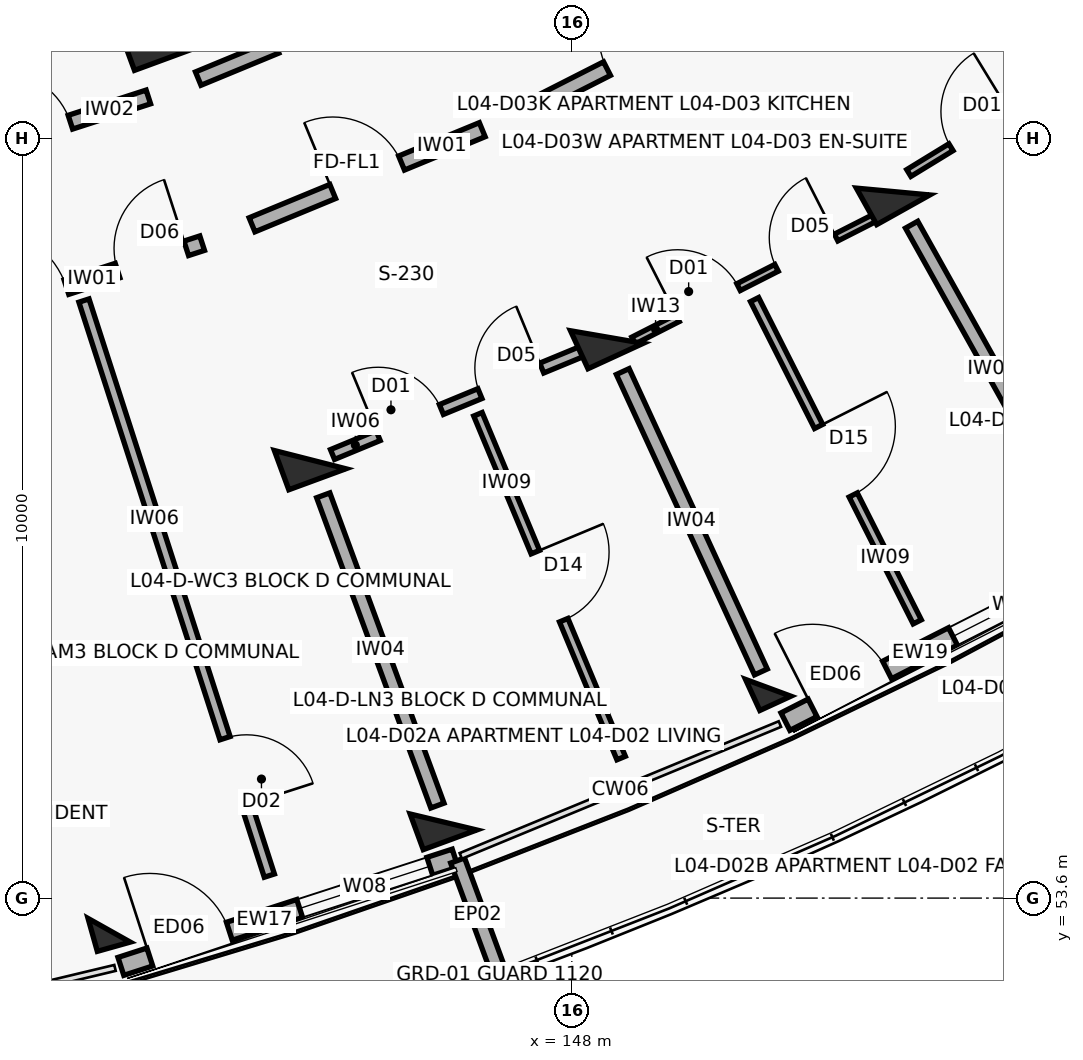
"""IFC4 building model, lengths in metres.
Left out: names, types, materials, properties, quantities, classifications, styles, units other than length and angle.
Written with IfcOpenShell. Run it as: python <this file> out.ifc"""

import sys

from ifc_helpers import new_model, si_unit, direction, frame, frame_2d, origin, origin_2d, place, context, subcontext, project, spatial, rectangle, extrude, element, fill, save


model = new_model("IFC4")
c1 = context("Model", 3, precision=1e-05, world=origin(), true_north=direction((0.0, 1.0)))
c2 = subcontext(c1, "Body", "Model", "MODEL_VIEW")
j1 = project(units=[si_unit("LENGTHUNIT", "METRE"), si_unit("PLANEANGLEUNIT", "RADIAN")], contexts=[c1])
p1 = place(None, origin())
s1 = spatial("IfcSite", under=j1, at=p1, CompositionType="ELEMENT")
p2 = place(p1, origin())
s2 = spatial("IfcBuilding", under=s1, at=p2, CompositionType="ELEMENT")
p3 = place(p2, frame((0.0, 0.0, 14.3)))
s3 = spatial("IfcBuildingStorey", under=s2, at=p3, CompositionType="ELEMENT", Elevation=14.3)
p4 = place(p3, frame((141.913, 53.177, 0.0), z_axis=(0.0, 0.0, 1.0), x_axis=(0.270600445976, -0.962691746426, 0.0)))
e1 = element("IfcColumn", 1, at=p4, inside=s3, PredefinedType="COLUMN", context=c2, shape_type="SweptSolid", body=[
    extrude(rectangle(XDim=0.45, YDim=0.45, at=origin_2d()), origin(), (0.0, 0.0, 1.0), 3.1),
])
for number, where, z_axis, x_axis in (
    (2, (142.527, 64.887, 0.0), (0.0, 0.0, 1.0), (0.345, -0.938, 0.0)),
    (3, (144.557, 59.369, 0.0), (0.0, 0.0, 1.0), (0.345, -0.938, 0.0)),
):
    element("IfcColumn", number, at=place(p3, frame(where, z_axis=z_axis, x_axis=x_axis)), inside=s3, PredefinedType="COLUMN", context=c2, shape_type="SweptSolid", body=[
        extrude(rectangle(XDim=0.55, YDim=0.8, at=origin_2d()), origin(), (0.0, 0.0, 1.0), 3.1),
    ])
p5 = place(p3, frame((146.311, 54.602, 0.0), z_axis=(0.0, 0.0, 1.0), x_axis=(0.345298198999, -0.93849302276, 0.0)))
e4 = element("IfcColumn", 4, at=p5, inside=s3, PredefinedType="COLUMN", context=c2, shape_type="SweptSolid", body=[
    extrude(rectangle(XDim=0.5, YDim=0.75, at=origin_2d()), origin(), (0.0, 0.0, 1.0), 3.1),
])
p6 = place(p3, frame((148.461, 60.982, 0.0), z_axis=(0.0, 0.0, 1.0), x_axis=(0.417867073801, -0.908508177527, 0.0)))
e5 = element("IfcColumn", 5, at=p6, inside=s3, PredefinedType="COLUMN", context=c2, shape_type="SweptSolid", body=[
    extrude(rectangle(XDim=0.55, YDim=0.8, at=origin_2d()), origin(), (0.0, 0.0, 1.0), 3.1),
])
p7 = place(p3, frame((150.584, 56.367, 0.0), z_axis=(0.0, 0.0, 1.0), x_axis=(0.417867073801, -0.908508177527, 0.0)))
e6 = element("IfcColumn", 6, at=p7, inside=s3, PredefinedType="COLUMN", context=c2, shape_type="SweptSolid", body=[
    extrude(rectangle(XDim=0.45, YDim=0.45, at=origin_2d()), origin(), (0.0, 0.0, 1.0), 3.1),
])
p8 = place(p3, frame((152.227, 62.897, 0.0), z_axis=(0.0, 0.0, 1.0), x_axis=(0.487859659139, -0.87292207727, 0.0)))
e7 = element("IfcColumn", 7, at=p8, inside=s3, PredefinedType="COLUMN", context=c2, shape_type="SweptSolid", body=[
    extrude(rectangle(XDim=0.55, YDim=0.8, at=origin_2d()), origin(), (0.0, 0.0, 1.0), 3.1),
])
p9 = place(p3, frame((142.067, 52.701, 0.0), z_axis=(0.0, 0.0, 1.0), x_axis=(0.951311584867, 0.308230868826, 0.0)))
e8 = element("IfcWall", 8, at=p9, inside=s3, PredefinedType="SOLIDWALL", context=c2, shape_type="SweptSolid", body=[
    extrude(rectangle(XDim=4.623, YDim=0.248, at=frame_2d((2.311, 0.0))), origin(), (0.0, 0.0, 1.0), 2.25),
])
p10 = place(p9, frame((0.4, 0.0, 0.0)))
e9 = element("IfcOpeningElement", 9, at=p10, cuts=e8, PredefinedType="OPENING", context=c2, shape_type="SweptSolid", body=[
    extrude(rectangle(XDim=1.1, YDim=2.15, at=frame_2d((0.55, 1.075))), frame((0.0, 0.134, 0.0), z_axis=(0.0, -1.0, 0.0), x_axis=(1.0, 0.0, 0.0)), (0.0, 0.0, 1.0), 0.268),
])
p11 = place(p9, frame((2.472, 0.0, 0.35)))
e10 = element("IfcOpeningElement", 10, at=p11, cuts=e8, PredefinedType="OPENING", context=c2, shape_type="SweptSolid", body=[
    extrude(rectangle(XDim=1.8, YDim=1.65, at=frame_2d((0.9, 0.825))), frame((0.0, 0.134, 0.0), z_axis=(0.0, -1.0, 0.0), x_axis=(1.0, 0.0, 0.0)), (0.0, 0.0, 1.0), 0.268),
])
p12 = place(p3, frame((146.498, 54.095, 0.0), z_axis=(0.0, 0.0, 1.0), x_axis=(0.345328180406, -0.938481991206, 0.0)))
e11 = element("IfcWall", 11, at=p12, inside=s3, PredefinedType="PARAPET", context=c2, shape_type="SweptSolid", body=[
    extrude(rectangle(XDim=1.53, YDim=0.195, at=frame_2d((0.765, 0.0))), origin(), (0.0, 0.0, 1.0), 2.25),
])
p13 = place(p3, frame((150.811, 55.922, 0.0), z_axis=(0.0, 0.0, 1.0), x_axis=(0.891407190547, 0.453203288428, 0.0)))
e12 = element("IfcWall", 12, at=p13, inside=s3, PredefinedType="SOLIDWALL", context=c2, shape_type="SweptSolid", body=[
    extrude(rectangle(XDim=4.623, YDim=0.258, at=frame_2d((2.311, 0.0))), origin(), (0.0, 0.0, 1.0), 2.25),
])
p14 = place(p13, frame((0.4, 0.0, 0.0)))
e13 = element("IfcOpeningElement", 13, at=p14, cuts=e12, PredefinedType="OPENING", context=c2, shape_type="SweptSolid", body=[
    extrude(rectangle(XDim=1.1, YDim=2.15, at=frame_2d((0.55, 1.075))), frame((0.0, 0.139, 0.0), z_axis=(0.0, -1.0, 0.0), x_axis=(1.0, 0.0, 0.0)), (0.0, 0.0, 1.0), 0.278),
])
p15 = place(p13, frame((2.472, 0.0, 0.35)))
e14 = element("IfcOpeningElement", 14, at=p15, cuts=e12, PredefinedType="OPENING", context=c2, shape_type="SweptSolid", body=[
    extrude(rectangle(XDim=1.8, YDim=1.65, at=frame_2d((0.9, 0.825))), frame((0.0, 0.139, 0.0), z_axis=(0.0, -1.0, 0.0), x_axis=(1.0, 0.0, 0.0)), (0.0, 0.0, 1.0), 0.278),
])
p16 = place(p3, frame((140.019, 61.208, 0.0), z_axis=(0.0, 0.0, 1.0), x_axis=(0.951323803878, 0.308193154005, 0.0)))
e15 = element("IfcWall", 15, at=p16, inside=s3, PredefinedType="SOLIDWALL", context=c2, shape_type="SweptSolid", body=[
    extrude(rectangle(XDim=3.277, YDim=0.2, at=frame_2d((1.639, 0.0))), origin(), (0.0, 0.0, 1.0), 2.08),
])
p17 = place(p16, frame((0.28, 0.0, 0.0)))
e16 = element("IfcOpeningElement", 16, at=p17, cuts=e15, PredefinedType="OPENING", context=c2, shape_type="SweptSolid", body=[
    extrude(rectangle(XDim=1.12, YDim=2.15, at=frame_2d((0.56, 1.075))), frame((0.0, 0.11, 0.0), z_axis=(0.0, -1.0, 0.0), x_axis=(1.0, 0.0, 0.0)), (0.0, 0.0, 1.0), 0.22),
])
p18 = place(p16, frame((2.107, 0.0, 0.0)))
e17 = element("IfcOpeningElement", 17, at=p18, cuts=e15, PredefinedType="OPENING", context=c2, shape_type="SweptSolid", body=[
    extrude(rectangle(XDim=0.95, YDim=2.1, at=frame_2d((0.475, 1.05))), frame((0.0, 0.11, 0.0), z_axis=(0.0, -1.0, 0.0), x_axis=(1.0, 0.0, 0.0)), (0.0, 0.0, 1.0), 0.22),
])
p19 = place(p3, frame((139.464, 63.181, 0.0), z_axis=(0.0, 0.0, 1.0), x_axis=(0.951336474448, 0.308154040027, 0.0)))
e18 = element("IfcWall", 18, at=p19, inside=s3, PredefinedType="SOLIDWALL", context=c2, shape_type="SweptSolid", body=[
    extrude(rectangle(XDim=3.116, YDim=0.19, at=frame_2d((1.558, 0.0))), origin(), (0.0, 0.0, 1.0), 2.08),
])
p20 = place(p19, frame((1.078, 0.0, 0.0)))
e19 = element("IfcOpeningElement", 19, at=p20, cuts=e18, PredefinedType="OPENING", context=c2, shape_type="SweptSolid", body=[
    extrude(rectangle(XDim=0.96, YDim=2.1, at=frame_2d((0.48, 1.05))), frame((0.0, 0.105, 0.0), z_axis=(0.0, -1.0, 0.0), x_axis=(1.0, 0.0, 0.0)), (0.0, 0.0, 1.0), 0.21),
])
p21 = place(p3, frame((141.581, 61.462, 0.0), z_axis=(0.0, 0.0, 1.0), x_axis=(0.306824216212, -0.951766200464, 0.0)))
e20 = element("IfcWall", 20, at=p21, inside=s3, PredefinedType="PARTITIONING", context=c2, shape_type="SweptSolid", body=[
    extrude(rectangle(XDim=7.95, YDim=0.14, at=frame_2d((3.975, 0.0))), origin(), (0.0, 0.0, 1.0), 2.08),
])
p22 = place(p21, frame((6.05, 0.0, 0.0)))
e21 = element("IfcOpeningElement", 21, at=p22, cuts=e20, PredefinedType="OPENING", context=c2, shape_type="SweptSolid", body=[
    extrude(rectangle(XDim=0.92, YDim=2.1, at=frame_2d((0.46, 1.05))), frame((0.0, 0.08, 0.0), z_axis=(0.0, -1.0, 0.0), x_axis=(1.0, 0.0, 0.0)), (0.0, 0.0, 1.0), 0.16),
])
p23 = place(p3, frame((143.793, 62.459, 0.0), z_axis=(0.0, 0.0, 1.0), x_axis=(0.924214561665, 0.381873596896, 0.0)))
e22 = element("IfcWall", 22, at=p23, inside=s3, PredefinedType="SOLIDWALL", context=c2, shape_type="SweptSolid", body=[
    extrude(rectangle(XDim=3.277, YDim=0.2, at=frame_2d((1.639, 0.0))), origin(), (0.0, 0.0, 1.0), 2.08),
])
p24 = place(p23, frame((1.148, 0.0, 0.0)))
e23 = element("IfcOpeningElement", 23, at=p24, cuts=e22, PredefinedType="OPENING", context=c2, shape_type="SweptSolid", body=[
    extrude(rectangle(XDim=0.98, YDim=2.15, at=frame_2d((0.49, 1.075))), frame((0.0, 0.11, 0.0), z_axis=(0.0, -1.0, 0.0), x_axis=(1.0, 0.0, 0.0)), (0.0, 0.0, 1.0), 0.22),
])
p25 = place(p3, frame((143.085, 64.383, 0.0), z_axis=(0.0, 0.0, 1.0), x_axis=(0.924213340202, 0.381876553081, 0.0)))
e24 = element("IfcWall", 24, at=p25, inside=s3, PredefinedType="SOLIDWALL", context=c2, shape_type="SweptSolid", body=[
    extrude(rectangle(XDim=3.116, YDim=0.19, at=frame_2d((1.558, 0.0))), origin(), (0.0, 0.0, 1.0), 2.08),
])
p26 = place(p25, frame((1.108, 0.0, 0.0)))
e25 = element("IfcOpeningElement", 25, at=p26, cuts=e24, PredefinedType="OPENING", context=c2, shape_type="SweptSolid", body=[
    extrude(rectangle(XDim=0.9, YDim=2.1, at=frame_2d((0.45, 1.05))), frame((0.0, 0.105, 0.0), z_axis=(0.0, -1.0, 0.0), x_axis=(1.0, 0.0, 0.0)), (0.0, 0.0, 1.0), 0.21),
])
p27 = place(p3, frame((144.852, 59.437, 0.0), z_axis=(0.0, 0.0, 1.0), x_axis=(0.924217547919, 0.381866369453, 0.0)))
e26 = element("IfcWall", 26, at=p27, inside=s3, PredefinedType="PARTITIONING", context=c2, shape_type="SweptSolid", body=[
    extrude(rectangle(XDim=3.628, YDim=0.14, at=frame_2d((1.814, 0.0))), origin(), (0.0, 0.0, 1.0), 2.08),
])
p28 = place(p27, frame((0.65, 0.0, 0.0)))
e27 = element("IfcOpeningElement", 27, at=p28, cuts=e26, PredefinedType="OPENING", context=c2, shape_type="SweptSolid", body=[
    extrude(rectangle(XDim=0.9, YDim=2.1, at=frame_2d((0.45, 1.05))), frame((0.0, 0.08, 0.0), z_axis=(0.0, -1.0, 0.0), x_axis=(1.0, 0.0, 0.0)), (0.0, 0.0, 1.0), 0.16),
])
p29 = place(p27, frame((2.098, 0.0, 0.0)))
e28 = element("IfcOpeningElement", 28, at=p29, cuts=e26, PredefinedType="OPENING", context=c2, shape_type="SweptSolid", body=[
    extrude(rectangle(XDim=0.88, YDim=2.1, at=frame_2d((0.44, 1.05))), frame((0.0, 0.08, 0.0), z_axis=(0.0, -1.0, 0.0), x_axis=(1.0, 0.0, 0.0)), (0.0, 0.0, 1.0), 0.16),
])
p30 = place(p3, frame((146.765, 59.966, 0.0), z_axis=(0.0, 0.0, 1.0), x_axis=(0.384548164276, -0.923104928679, 0.0)))
e29 = element("IfcWall", 29, at=p30, inside=s3, PredefinedType="PARTITIONING", context=c2, shape_type="SweptSolid", body=[
    extrude(rectangle(XDim=4.9, YDim=0.12, at=frame_2d((2.45, 0.0))), origin(), (0.0, 0.0, 1.0), 2.08),
])
p31 = place(p30, frame((1.965, 0.0, 0.0)))
e30 = element("IfcOpeningElement", 30, at=p31, cuts=e29, PredefinedType="OPENING", context=c2, shape_type="SweptSolid", body=[
    extrude(rectangle(XDim=0.97, YDim=2.1, at=frame_2d((0.485, 1.05))), frame((0.0, 0.07, 0.0), z_axis=(0.0, -1.0, 0.0), x_axis=(1.0, 0.0, 0.0)), (0.0, 0.0, 1.0), 0.14),
])
p32 = place(p3, frame((144.73, 58.9, 0.0), z_axis=(0.0, 0.0, 1.0), x_axis=(0.345273579683, -0.938502080537, 0.0)))
e31 = element("IfcWall", 31, at=p32, inside=s3, PredefinedType="SOLIDWALL", context=c2, shape_type="SweptSolid", body=[
    extrude(rectangle(XDim=4.35, YDim=0.185, at=frame_2d((2.175, 0.0))), origin(), (0.0, 0.0, 1.0), 2.08),
])
p33 = place(p3, frame((147.457, 64.003, 0.0), z_axis=(0.0, 0.0, 1.0), x_axis=(0.891412167565, 0.45319349898, 0.0)))
e32 = element("IfcWall", 32, at=p33, inside=s3, PredefinedType="SOLIDWALL", context=c2, shape_type="SweptSolid", body=[
    extrude(rectangle(XDim=3.277, YDim=0.2, at=frame_2d((1.639, 0.0))), origin(), (0.0, 0.0, 1.0), 2.08),
])
p34 = place(p33, frame((1.128, 0.0, 0.0)))
e33 = element("IfcOpeningElement", 33, at=p34, cuts=e32, PredefinedType="OPENING", context=c2, shape_type="SweptSolid", body=[
    extrude(rectangle(XDim=1.02, YDim=2.15, at=frame_2d((0.51, 1.075))), frame((0.0, 0.11, 0.0), z_axis=(0.0, -1.0, 0.0), x_axis=(1.0, 0.0, 0.0)), (0.0, 0.0, 1.0), 0.22),
])
p35 = place(p3, frame((148.812, 60.937, 0.0), z_axis=(0.0, 0.0, 1.0), x_axis=(0.89140212369, 0.453213254309, 0.0)))
e34 = element("IfcWall", 34, at=p35, inside=s3, PredefinedType="PARTITIONING", context=c2, shape_type="SweptSolid", body=[
    extrude(rectangle(XDim=3.64, YDim=0.1, at=frame_2d((1.82, 0.0))), origin(), (0.0, 0.0, 1.0), 2.08),
])
p36 = place(p35, frame((0.65, 0.0, 0.0)))
e35 = element("IfcOpeningElement", 35, at=p36, cuts=e34, PredefinedType="OPENING", context=c2, shape_type="SweptSolid", body=[
    extrude(rectangle(XDim=0.9, YDim=2.1, at=frame_2d((0.45, 1.05))), frame((0.0, 0.06, 0.0), z_axis=(0.0, -1.0, 0.0), x_axis=(1.0, 0.0, 0.0)), (0.0, 0.0, 1.0), 0.12),
])
p37 = place(p35, frame((2.11, 0.0, 0.0)))
e36 = element("IfcOpeningElement", 36, at=p37, cuts=e34, PredefinedType="OPENING", context=c2, shape_type="SweptSolid", body=[
    extrude(rectangle(XDim=0.88, YDim=2.1, at=frame_2d((0.44, 1.05))), frame((0.0, 0.06, 0.0), z_axis=(0.0, -1.0, 0.0), x_axis=(1.0, 0.0, 0.0)), (0.0, 0.0, 1.0), 0.12),
])
p38 = place(p3, frame((150.404, 61.475, 0.0), z_axis=(0.0, 0.0, 1.0), x_axis=(0.450664257057, -0.892693523787, 0.0)))
e37 = element("IfcWall", 37, at=p38, inside=s3, PredefinedType="PARTITIONING", context=c2, shape_type="SweptSolid", body=[
    extrude(rectangle(XDim=4.75, YDim=0.12, at=frame_2d((2.375, 0.0))), origin(), (0.0, 0.0, 1.0), 2.08),
])
p39 = place(p38, frame((1.87, 0.0, 0.0)))
e38 = element("IfcOpeningElement", 38, at=p39, cuts=e37, PredefinedType="OPENING", context=c2, shape_type="SweptSolid", body=[
    extrude(rectangle(XDim=1.01, YDim=2.1, at=frame_2d((0.505, 1.05))), frame((0.0, 0.07, 0.0), z_axis=(0.0, -1.0, 0.0), x_axis=(1.0, 0.0, 0.0)), (0.0, 0.0, 1.0), 0.14),
])
p40 = place(p3, frame((148.67, 60.528, 0.0), z_axis=(0.0, 0.0, 1.0), x_axis=(0.417837051164, -0.908521985796, 0.0)))
e39 = element("IfcWall", 39, at=p40, inside=s3, PredefinedType="SOLIDWALL", context=c2, shape_type="SweptSolid", body=[
    extrude(rectangle(XDim=4.35, YDim=0.185, at=frame_2d((2.175, 0.0))), origin(), (0.0, 0.0, 1.0), 2.08),
])
p41 = place(p3, frame((152.434, 63.141, 0.0), z_axis=(0.0, 0.0, 1.0), x_axis=(0.853089873067, 0.521763996909, 0.0)))
e40 = element("IfcWall", 40, at=p41, inside=s3, PredefinedType="PARTITIONING", context=c2, shape_type="SweptSolid", body=[
    extrude(rectangle(XDim=3.616, YDim=0.105, at=frame_2d((1.808, 0.0))), origin(), (0.0, 0.0, 1.0), 2.08),
])
p42 = place(p41, frame((0.65, 0.0, 0.0)))
e41 = element("IfcOpeningElement", 41, at=p42, cuts=e40, PredefinedType="OPENING", context=c2, shape_type="SweptSolid", body=[
    extrude(rectangle(XDim=0.9, YDim=2.1, at=frame_2d((0.45, 1.05))), frame((0.0, 0.062, 0.0), z_axis=(0.0, -1.0, 0.0), x_axis=(1.0, 0.0, 0.0)), (0.0, 0.0, 1.0), 0.125),
])
p43 = place(p41, frame((2.086, 0.0, 0.0)))
e42 = element("IfcOpeningElement", 42, at=p43, cuts=e40, PredefinedType="OPENING", context=c2, shape_type="SweptSolid", body=[
    extrude(rectangle(XDim=0.88, YDim=2.1, at=frame_2d((0.44, 1.05))), frame((0.0, 0.062, 0.0), z_axis=(0.0, -1.0, 0.0), x_axis=(1.0, 0.0, 0.0)), (0.0, 0.0, 1.0), 0.125),
])
p44 = place(p3, frame((152.471, 62.46, 0.0), z_axis=(0.0, 0.0, 1.0), x_axis=(0.487866639184, -0.872918176218, 0.0)))
e43 = element("IfcWall", 43, at=p44, inside=s3, PredefinedType="SOLIDWALL", context=c2, shape_type="SweptSolid", body=[
    extrude(rectangle(XDim=4.35, YDim=0.185, at=frame_2d((2.175, 0.0))), origin(), (0.0, 0.0, 1.0), 2.08),
])
p45 = place(p10, origin())
e44 = element("IfcDoor", 44, at=p45, inside=s3, OperationType="SINGLE_SWING_LEFT", PredefinedType="DOOR", context=c2, shape_type="SweptSolid", body=[
    extrude(rectangle(XDim=1.1, YDim=2.15, at=frame_2d((0.55, 1.075))), frame((0.0, 0.025, 0.0), z_axis=(0.0, -1.0, 0.0), x_axis=(1.0, 0.0, 0.0)), (0.0, 0.0, 1.0), 0.05),
])
fill(e9, e44)
p46 = place(p11, origin())
e45 = element("IfcWindow", 45, at=p46, inside=s3, PartitioningType="TRIPLE_PANEL_VERTICAL", PredefinedType="WINDOW", context=c2, shape_type="SweptSolid", body=[
    extrude(rectangle(XDim=1.8, YDim=1.65, at=frame_2d((0.9, 0.825))), frame((0.0, 0.03, 0.0), z_axis=(0.0, -1.0, 0.0), x_axis=(1.0, 0.0, 0.0)), (0.0, 0.0, 1.0), 0.06),
])
fill(e10, e45)
p47 = place(p14, origin())
e46 = element("IfcDoor", 46, at=p47, inside=s3, OperationType="SINGLE_SWING_LEFT", PredefinedType="DOOR", context=c2, shape_type="SweptSolid", body=[
    extrude(rectangle(XDim=1.1, YDim=2.15, at=frame_2d((0.55, 1.075))), frame((0.0, 0.025, 0.0), z_axis=(0.0, -1.0, 0.0), x_axis=(1.0, 0.0, 0.0)), (0.0, 0.0, 1.0), 0.05),
])
fill(e13, e46)
p48 = place(p15, origin())
e47 = element("IfcWindow", 47, at=p48, inside=s3, PartitioningType="TRIPLE_PANEL_VERTICAL", PredefinedType="WINDOW", context=c2, shape_type="SweptSolid", body=[
    extrude(rectangle(XDim=1.8, YDim=1.65, at=frame_2d((0.9, 0.825))), frame((0.0, 0.03, 0.0), z_axis=(0.0, -1.0, 0.0), x_axis=(1.0, 0.0, 0.0)), (0.0, 0.0, 1.0), 0.06),
])
fill(e14, e47)
p49 = place(p17, origin())
e48 = element("IfcDoor", 48, at=p49, inside=s3, OperationType="SINGLE_SWING_LEFT", PredefinedType="DOOR", context=c2, shape_type="SweptSolid", body=[
    extrude(rectangle(XDim=1.12, YDim=2.15, at=frame_2d((0.56, 1.075))), frame((0.0, 0.025, 0.0), z_axis=(0.0, -1.0, 0.0), x_axis=(1.0, 0.0, 0.0)), (0.0, 0.0, 1.0), 0.05),
])
fill(e16, e48)
p50 = place(p18, origin())
e49 = element("IfcDoor", 49, at=p50, inside=s3, OperationType="SINGLE_SWING_RIGHT", PredefinedType="DOOR", context=c2, shape_type="SweptSolid", body=[
    extrude(rectangle(XDim=0.95, YDim=2.1, at=frame_2d((0.475, 1.05))), frame((0.0, 0.025, 0.0), z_axis=(0.0, -1.0, 0.0), x_axis=(1.0, 0.0, 0.0)), (0.0, 0.0, 1.0), 0.05),
])
fill(e17, e49)
p51 = place(p20, origin())
e50 = element("IfcDoor", 50, at=p51, inside=s3, OperationType="SINGLE_SWING_LEFT", PredefinedType="DOOR", context=c2, shape_type="SweptSolid", body=[
    extrude(rectangle(XDim=0.96, YDim=2.1, at=frame_2d((0.48, 1.05))), frame((0.0, 0.025, 0.0), z_axis=(0.0, -1.0, 0.0), x_axis=(1.0, 0.0, 0.0)), (0.0, 0.0, 1.0), 0.05),
])
fill(e19, e50)
p52 = place(p22, origin())
e51 = element("IfcDoor", 51, at=p52, inside=s3, OperationType="SINGLE_SWING_RIGHT", PredefinedType="DOOR", context=c2, shape_type="SweptSolid", body=[
    extrude(rectangle(XDim=0.92, YDim=2.1, at=frame_2d((0.46, 1.05))), frame((0.0, 0.025, 0.0), z_axis=(0.0, -1.0, 0.0), x_axis=(1.0, 0.0, 0.0)), (0.0, 0.0, 1.0), 0.05),
])
fill(e21, e51)
p53 = place(p24, origin())
e52 = element("IfcDoor", 52, at=p53, inside=s3, OperationType="SINGLE_SWING_LEFT", PredefinedType="DOOR", context=c2, shape_type="SweptSolid", body=[
    extrude(rectangle(XDim=0.98, YDim=2.15, at=frame_2d((0.49, 1.075))), frame((0.0, 0.025, 0.0), z_axis=(0.0, -1.0, 0.0), x_axis=(1.0, 0.0, 0.0)), (0.0, 0.0, 1.0), 0.05),
])
fill(e23, e52)
p54 = place(p28, origin())
e53 = element("IfcDoor", 53, at=p54, inside=s3, OperationType="SINGLE_SWING_LEFT", PredefinedType="DOOR", context=c2, shape_type="SweptSolid", body=[
    extrude(rectangle(XDim=0.9, YDim=2.1, at=frame_2d((0.45, 1.05))), frame((0.0, 0.025, 0.0), z_axis=(0.0, -1.0, 0.0), x_axis=(1.0, 0.0, 0.0)), (0.0, 0.0, 1.0), 0.05),
])
fill(e27, e53)
p55 = place(p29, origin())
e54 = element("IfcDoor", 54, at=p55, inside=s3, OperationType="SINGLE_SWING_RIGHT", PredefinedType="DOOR", context=c2, shape_type="SweptSolid", body=[
    extrude(rectangle(XDim=0.88, YDim=2.1, at=frame_2d((0.44, 1.05))), frame((0.0, 0.025, 0.0), z_axis=(0.0, -1.0, 0.0), x_axis=(1.0, 0.0, 0.0)), (0.0, 0.0, 1.0), 0.05),
])
fill(e28, e54)
p56 = place(p31, origin())
e55 = element("IfcDoor", 55, at=p56, inside=s3, OperationType="SINGLE_SWING_LEFT", PredefinedType="DOOR", context=c2, shape_type="SweptSolid", body=[
    extrude(rectangle(XDim=0.97, YDim=2.1, at=frame_2d((0.485, 1.05))), frame((0.0, 0.025, 0.0), z_axis=(0.0, -1.0, 0.0), x_axis=(1.0, 0.0, 0.0)), (0.0, 0.0, 1.0), 0.05),
])
fill(e30, e55)
p57 = place(p34, origin())
e56 = element("IfcDoor", 56, at=p57, inside=s3, OperationType="SINGLE_SWING_RIGHT", PredefinedType="DOOR", context=c2, shape_type="SweptSolid", body=[
    extrude(rectangle(XDim=1.02, YDim=2.15, at=frame_2d((0.51, 1.075))), frame((0.0, 0.025, 0.0), z_axis=(0.0, -1.0, 0.0), x_axis=(1.0, 0.0, 0.0)), (0.0, 0.0, 1.0), 0.05),
])
fill(e33, e56)
p58 = place(p36, origin())
e57 = element("IfcDoor", 57, at=p58, inside=s3, OperationType="SINGLE_SWING_LEFT", PredefinedType="DOOR", context=c2, shape_type="SweptSolid", body=[
    extrude(rectangle(XDim=0.9, YDim=2.1, at=frame_2d((0.45, 1.05))), frame((0.0, 0.025, 0.0), z_axis=(0.0, -1.0, 0.0), x_axis=(1.0, 0.0, 0.0)), (0.0, 0.0, 1.0), 0.05),
])
fill(e35, e57)
p59 = place(p37, origin())
e58 = element("IfcDoor", 58, at=p59, inside=s3, OperationType="SINGLE_SWING_RIGHT", PredefinedType="DOOR", context=c2, shape_type="SweptSolid", body=[
    extrude(rectangle(XDim=0.88, YDim=2.1, at=frame_2d((0.44, 1.05))), frame((0.0, 0.025, 0.0), z_axis=(0.0, -1.0, 0.0), x_axis=(1.0, 0.0, 0.0)), (0.0, 0.0, 1.0), 0.05),
])
fill(e36, e58)
p60 = place(p39, origin())
e59 = element("IfcDoor", 59, at=p60, inside=s3, OperationType="SINGLE_SWING_LEFT", PredefinedType="DOOR", context=c2, shape_type="SweptSolid", body=[
    extrude(rectangle(XDim=1.01, YDim=2.1, at=frame_2d((0.505, 1.05))), frame((0.0, 0.025, 0.0), z_axis=(0.0, -1.0, 0.0), x_axis=(1.0, 0.0, 0.0)), (0.0, 0.0, 1.0), 0.05),
])
fill(e38, e59)
p61 = place(p42, origin())
e60 = element("IfcDoor", 60, at=p61, inside=s3, OperationType="SINGLE_SWING_RIGHT", PredefinedType="DOOR", context=c2, shape_type="SweptSolid", body=[
    extrude(rectangle(XDim=0.9, YDim=2.1, at=frame_2d((0.45, 1.05))), frame((0.0, 0.025, 0.0), z_axis=(0.0, -1.0, 0.0), x_axis=(1.0, 0.0, 0.0)), (0.0, 0.0, 1.0), 0.05),
])
fill(e41, e60)
save(model, sys.argv[1])
